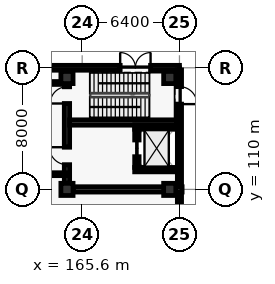
"""IFC4 building model, lengths in metres.
Left out: names, types, materials, properties, quantities, classifications, styles, units other than length and angle.
Written with IfcOpenShell. Run it as: python <this file> out.ifc"""

import sys

from ifc_helpers import new_model, si_unit, direction, frame, frame_2d, origin, origin_2d, place, context, subcontext, project, spatial, rectangle, extrude, element, fill, save


model = new_model("IFC4")
c1 = context("Model", 3, precision=1e-05, world=origin(), true_north=direction((0.0, 1.0)))
c2 = subcontext(c1, "Body", "Model", "MODEL_VIEW")
j1 = project(units=[si_unit("LENGTHUNIT", "METRE"), si_unit("PLANEANGLEUNIT", "RADIAN")], contexts=[c1])
p1 = place(None, origin())
s1 = spatial("IfcSite", under=j1, at=p1, CompositionType="ELEMENT")
p2 = place(p1, origin())
s2 = spatial("IfcBuilding", under=s1, at=p2, CompositionType="ELEMENT")
p3 = place(p2, origin())
s3 = spatial("IfcBuildingStorey", under=s2, at=p3, CompositionType="ELEMENT", Elevation=0.0)
for number, where, z_axis, x_axis in (
    (1, (164.6, 110.0, 0.0), (0.0, 0.0, 1.0), (1.0, 0.0, 0.0)),
    (2, (164.6, 117.36, 0.0), (0.0, 0.0, 1.0), (1.0, 0.0, 0.0)),
    (3, (171.36, 110.0, 0.0), (0.0, 0.0, 1.0), (1.0, 0.0, 0.0)),
    (4, (171.36, 117.36, 0.0), (0.0, 0.0, 1.0), (1.0, 0.0, 0.0)),
):
    element("IfcColumn", number, at=place(p3, frame(where, z_axis=z_axis, x_axis=x_axis)), inside=s3, PredefinedType="COLUMN", context=c2, shape_type="SweptSolid", body=[
        extrude(rectangle(XDim=0.8, YDim=0.8, at=origin_2d()), origin(), (0.0, 0.0, 1.0), 5.4),
    ])
p4 = place(p3, frame((139.6, 118.0, 0.0), z_axis=(0.0, 0.0, 1.0), x_axis=(1.0, 0.0, 0.0)))
e5 = element("IfcWall", 5, at=p4, inside=s3, PredefinedType="SOLIDWALL", context=c2, shape_type="SweptSolid", body=[
    extrude(rectangle(XDim=32.4, YDim=0.32, at=frame_2d((16.2, 0.0))), origin(), (0.0, 0.0, 1.0), 5.14),
])
p5 = place(p4, frame((28.5, 0.0, 0.0)))
e6 = element("IfcOpeningElement", 6, at=p5, cuts=e5, PredefinedType="OPENING", context=c2, shape_type="SweptSolid", body=[
    extrude(rectangle(XDim=2.0, YDim=2.5, at=frame_2d((1.0, 1.25))), frame((0.0, 0.17, 0.0), z_axis=(0.0, -1.0, 0.0), x_axis=(1.0, 0.0, 0.0)), (0.0, 0.0, 1.0), 0.34),
])
p6 = place(p4, frame((2.2, 0.0, 0.9)))
e7 = element("IfcOpeningElement", 7, at=p6, cuts=e5, PredefinedType="OPENING", context=c2, shape_type="SweptSolid", body=[
    extrude(rectangle(XDim=3.6, YDim=2.6, at=frame_2d((1.8, 1.3))), frame((0.0, 0.17, 0.0), z_axis=(0.0, -1.0, 0.0), x_axis=(1.0, 0.0, 0.0)), (0.0, 0.0, 1.0), 0.34),
])
p7 = place(p4, frame((7.96, 0.0, 0.9)))
e8 = element("IfcOpeningElement", 8, at=p7, cuts=e5, PredefinedType="OPENING", context=c2, shape_type="SweptSolid", body=[
    extrude(rectangle(XDim=3.8, YDim=2.6, at=frame_2d((1.9, 1.3))), frame((0.0, 0.17, 0.0), z_axis=(0.0, -1.0, 0.0), x_axis=(1.0, 0.0, 0.0)), (0.0, 0.0, 1.0), 0.34),
])
p8 = place(p4, frame((13.72, 0.0, 0.9)))
e9 = element("IfcOpeningElement", 9, at=p8, cuts=e5, PredefinedType="OPENING", context=c2, shape_type="SweptSolid", body=[
    extrude(rectangle(XDim=1.6, YDim=1.65, at=frame_2d((0.8, 0.825))), frame((0.0, 0.17, 0.0), z_axis=(0.0, -1.0, 0.0), x_axis=(1.0, 0.0, 0.0)), (0.0, 0.0, 1.0), 0.34),
])
p9 = place(p4, frame((19.48, 0.0, 0.9)))
e10 = element("IfcOpeningElement", 10, at=p9, cuts=e5, PredefinedType="OPENING", context=c2, shape_type="SweptSolid", body=[
    extrude(rectangle(XDim=1.8, YDim=1.65, at=frame_2d((0.9, 0.825))), frame((0.0, 0.17, 0.0), z_axis=(0.0, -1.0, 0.0), x_axis=(1.0, 0.0, 0.0)), (0.0, 0.0, 1.0), 0.34),
])
p10 = place(p3, frame((172.0, 117.86, 0.0), z_axis=(0.0, 0.0, 1.0), x_axis=(0.0, -1.0, 0.0)))
e11 = element("IfcWall", 11, at=p10, inside=s3, PredefinedType="SOLIDWALL", context=c2, shape_type="SweptSolid", body=[
    extrude(rectangle(XDim=46.12, YDim=0.275, at=frame_2d((23.06, 0.0))), origin(), (0.0, 0.0, 1.0), 5.14),
])
p11 = place(p10, frame((43.87, 0.0, 0.0)))
e12 = element("IfcOpeningElement", 12, at=p11, cuts=e11, PredefinedType="OPENING", context=c2, shape_type="SweptSolid", body=[
    extrude(rectangle(XDim=1.15, YDim=2.2, at=frame_2d((0.575, 1.1))), frame((0.0, 0.147, 0.0), z_axis=(0.0, -1.0, 0.0), x_axis=(1.0, 0.0, 0.0)), (0.0, 0.0, 1.0), 0.295),
])
p12 = place(p10, frame((1.1, 0.0, 0.0)))
e13 = element("IfcOpeningElement", 13, at=p12, cuts=e11, PredefinedType="OPENING", context=c2, shape_type="SweptSolid", body=[
    extrude(rectangle(XDim=1.15, YDim=2.2, at=frame_2d((0.575, 1.1))), frame((0.0, 0.147, 0.0), z_axis=(0.0, -1.0, 0.0), x_axis=(1.0, 0.0, 0.0)), (0.0, 0.0, 1.0), 0.295),
])
p13 = place(p3, frame((165.002, 110.0, 0.0), z_axis=(0.0, 0.0, 1.0), x_axis=(1.0, 0.0, 0.0)))
e14 = element("IfcWall", 14, at=p13, inside=s3, PredefinedType="SHEAR", context=c2, shape_type="SweptSolid", body=[
    extrude(rectangle(XDim=7.173, YDim=0.35, at=frame_2d((3.586, 0.0))), origin(), (0.0, 0.0, 1.0), 5.14),
])
p14 = place(p3, frame((164.6, 110.402, 0.0), z_axis=(0.0, 0.0, 1.0), x_axis=(0.0, 1.0, 0.0)))
e15 = element("IfcWall", 15, at=p14, inside=s3, PredefinedType="SHEAR", context=c2, shape_type="SweptSolid", body=[
    extrude(rectangle(XDim=7.423, YDim=0.35, at=frame_2d((3.711, 0.0))), origin(), (0.0, 0.0, 1.0), 5.14),
])
p15 = place(p14, frame((5.248, 0.0, 0.0)))
e16 = element("IfcOpeningElement", 16, at=p15, cuts=e15, PredefinedType="OPENING", context=c2, shape_type="SweptSolid", body=[
    extrude(rectangle(XDim=1.1, YDim=2.15, at=frame_2d((0.55, 1.075))), frame((0.0, 0.185, 0.0), z_axis=(0.0, -1.0, 0.0), x_axis=(1.0, 0.0, 0.0)), (0.0, 0.0, 1.0), 0.37),
])
p16 = place(p14, frame((1.223, 0.0, 0.0)))
e17 = element("IfcOpeningElement", 17, at=p16, cuts=e15, PredefinedType="OPENING", context=c2, shape_type="SweptSolid", body=[
    extrude(rectangle(XDim=1.15, YDim=2.2, at=frame_2d((0.575, 1.1))), frame((0.0, 0.185, 0.0), z_axis=(0.0, -1.0, 0.0), x_axis=(1.0, 0.0, 0.0)), (0.0, 0.0, 1.0), 0.37),
])
p17 = place(p3, frame((164.775, 114.4, 0.0), z_axis=(0.0, 0.0, 1.0), x_axis=(1.0, 0.0, 0.0)))
e18 = element("IfcWall", 18, at=p17, inside=s3, PredefinedType="SHEAR", context=c2, shape_type="SweptSolid", body=[
    extrude(rectangle(XDim=7.05, YDim=0.35, at=frame_2d((3.525, 0.0))), origin(), (0.0, 0.0, 1.0), 5.14),
])
for number, where, z_axis, x_axis in (
    (19, (169.055, 111.3, 0.0), (0.0, 0.0, 1.0), (1.0, 0.0, 0.0)),
    (20, (169.055, 114.1, 0.0), (0.0, 0.0, 1.0), (1.0, 0.0, 0.0)),
):
    element("IfcWall", number, at=place(p3, frame(where, z_axis=z_axis, x_axis=x_axis)), inside=s3, PredefinedType="SHEAR", context=c2, shape_type="SweptSolid", body=[
        extrude(rectangle(XDim=2.89, YDim=0.29, at=frame_2d((1.445, 0.0))), origin(), (0.0, 0.0, 1.0), 5.14),
    ])
p18 = place(p3, frame((169.2, 111.445, 0.0), z_axis=(0.0, 0.0, 1.0), x_axis=(0.0, 1.0, 0.0)))
e21 = element("IfcWall", 21, at=p18, inside=s3, PredefinedType="SHEAR", context=c2, shape_type="SweptSolid", body=[
    extrude(rectangle(XDim=2.51, YDim=0.29, at=frame_2d((1.255, 0.0))), origin(), (0.0, 0.0, 1.0), 5.14),
])
p19 = place(p18, frame((0.705, 0.0, 0.0)))
e22 = element("IfcOpeningElement", 22, at=p19, cuts=e21, PredefinedType="OPENING", context=c2, shape_type="SweptSolid", body=[
    extrude(rectangle(XDim=1.1, YDim=2.15, at=frame_2d((0.55, 1.075))), frame((0.0, 0.155, 0.0), z_axis=(0.0, -1.0, 0.0), x_axis=(1.0, 0.0, 0.0)), (0.0, 0.0, 1.0), 0.31),
])
p20 = place(p3, frame((160.105, 111.0, 0.0), z_axis=(0.0, 0.0, 1.0), x_axis=(1.0, 0.0, 0.0)))
e23 = element("IfcWall", 23, at=p20, inside=s3, PredefinedType="PARTITIONING", context=c2, shape_type="SweptSolid", body=[
    extrude(rectangle(XDim=4.495, YDim=0.19, at=frame_2d((2.248, 0.0))), origin(), (0.0, 0.0, 1.0), 5.14),
])
p21 = place(p3, frame((160.105, 117.0, 0.0), z_axis=(0.0, 0.0, 1.0), x_axis=(1.0, 0.0, 0.0)))
e24 = element("IfcWall", 24, at=p21, inside=s3, PredefinedType="PARTITIONING", context=c2, shape_type="SweptSolid", body=[
    extrude(rectangle(XDim=4.093, YDim=0.19, at=frame_2d((2.046, 0.0))), origin(), (0.0, 0.0, 1.0), 4.49),
])
p22 = place(p12, origin())
e25 = element("IfcDoor", 25, at=p22, inside=s3, OperationType="SINGLE_SWING_RIGHT", PredefinedType="DOOR", context=c2, shape_type="SweptSolid", body=[
    extrude(rectangle(XDim=1.15, YDim=2.2, at=frame_2d((0.575, 1.1))), frame((0.0, 0.025, 0.0), z_axis=(0.0, -1.0, 0.0), x_axis=(1.0, 0.0, 0.0)), (0.0, 0.0, 1.0), 0.05),
])
fill(e13, e25)
p23 = place(p5, origin())
e26 = element("IfcDoor", 26, at=p23, inside=s3, OperationType="DOUBLE_SWING_LEFT", PredefinedType="DOOR", context=c2, shape_type="SweptSolid", body=[
    extrude(rectangle(XDim=2.0, YDim=2.5, at=frame_2d((1.0, 1.25))), frame((0.0, 0.025, 0.0), z_axis=(0.0, -1.0, 0.0), x_axis=(1.0, 0.0, 0.0)), (0.0, 0.0, 1.0), 0.05),
])
fill(e6, e26)
p24 = place(p15, origin())
e27 = element("IfcDoor", 27, at=p24, inside=s3, OperationType="SINGLE_SWING_LEFT", PredefinedType="DOOR", context=c2, shape_type="SweptSolid", body=[
    extrude(rectangle(XDim=1.1, YDim=2.15, at=frame_2d((0.55, 1.075))), frame((0.0, 0.025, 0.0), z_axis=(0.0, -1.0, 0.0), x_axis=(1.0, 0.0, 0.0)), (0.0, 0.0, 1.0), 0.05),
])
fill(e16, e27)
p25 = place(p16, origin())
e28 = element("IfcDoor", 28, at=p25, inside=s3, OperationType="SINGLE_SWING_RIGHT", PredefinedType="DOOR", context=c2, shape_type="SweptSolid", body=[
    extrude(rectangle(XDim=1.15, YDim=2.2, at=frame_2d((0.575, 1.1))), frame((0.0, 0.025, 0.0), z_axis=(0.0, -1.0, 0.0), x_axis=(1.0, 0.0, 0.0)), (0.0, 0.0, 1.0), 0.05),
])
fill(e17, e28)
p26 = place(p19, origin())
e29 = element("IfcDoor", 29, at=p26, inside=s3, OperationType="SLIDING_TO_LEFT", PredefinedType="DOOR", context=c2, shape_type="SweptSolid", body=[
    extrude(rectangle(XDim=1.1, YDim=2.15, at=frame_2d((0.55, 1.075))), frame((0.0, 0.025, 0.0), z_axis=(0.0, -1.0, 0.0), x_axis=(1.0, 0.0, 0.0)), (0.0, 0.0, 1.0), 0.05),
])
fill(e22, e29)
save(model, sys.argv[1])
